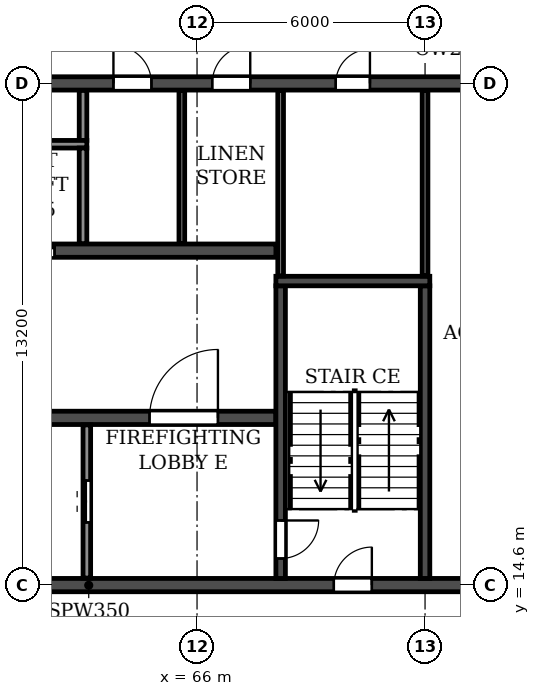
"""IFC4 building model, lengths in metres.
Left out: names, types, materials, properties, quantities, classifications, styles, units other than length and angle.
Written with IfcOpenShell. Run it as: python <this file> out.ifc"""

import sys

from ifc_helpers import new_model, si_unit, direction, frame, frame_2d, origin, place, context, subcontext, project, spatial, rectangle, extrude, element, fill, save


model = new_model("IFC4")
c1 = context("Model", 3, precision=1e-05, world=origin(), true_north=direction((0.0, 1.0)))
c2 = subcontext(c1, "Body", "Model", "MODEL_VIEW")
j1 = project(units=[si_unit("LENGTHUNIT", "METRE"), si_unit("PLANEANGLEUNIT", "RADIAN")], contexts=[c1])
p1 = place(None, origin())
s1 = spatial("IfcSite", under=j1, at=p1, CompositionType="ELEMENT")
p2 = place(p1, origin())
s2 = spatial("IfcBuilding", under=s1, at=p2, CompositionType="ELEMENT")
p3 = place(p2, frame((0.0, 0.0, 241.2)))
s3 = spatial("IfcBuildingStorey", under=s2, at=p3, CompositionType="ELEMENT", Elevation=241.2)
p4 = place(p3, frame((18.2, 14.6, 0.0), z_axis=(0.0, 0.0, 1.0), x_axis=(1.0, 0.0, 0.0)))
e1 = element("IfcWall", 1, at=p4, inside=s3, PredefinedType="SOLIDWALL", context=c2, shape_type="SweptSolid", body=[
    extrude(rectangle(XDim=65.6, YDim=0.35, at=frame_2d((32.8, 0.0))), origin(), (0.0, 0.0, 1.0), 3.08),
])
p5 = place(p4, frame((0.7, 0.0, 0.0)))
e2 = element("IfcOpeningElement", 2, at=p5, cuts=e1, PredefinedType="OPENING", context=c2, shape_type="SweptSolid", body=[
    extrude(rectangle(XDim=1.0, YDim=2.1, at=frame_2d((0.5, 1.05))), frame((0.0, 0.185, 0.0), z_axis=(0.0, -1.0, 0.0), x_axis=(1.0, 0.0, 0.0)), (0.0, 0.0, 1.0), 0.37),
])
p6 = place(p4, frame((8.6, 0.0, 0.0)))
e3 = element("IfcOpeningElement", 3, at=p6, cuts=e1, PredefinedType="OPENING", context=c2, shape_type="SweptSolid", body=[
    extrude(rectangle(XDim=1.0, YDim=2.1, at=frame_2d((0.5, 1.05))), frame((0.0, 0.185, 0.0), z_axis=(0.0, -1.0, 0.0), x_axis=(1.0, 0.0, 0.0)), (0.0, 0.0, 1.0), 0.37),
])
p7 = place(p4, frame((13.2, 0.0, 0.0)))
e4 = element("IfcOpeningElement", 4, at=p7, cuts=e1, PredefinedType="OPENING", context=c2, shape_type="SweptSolid", body=[
    extrude(rectangle(XDim=1.0, YDim=2.1, at=frame_2d((0.5, 1.05))), frame((0.0, 0.185, 0.0), z_axis=(0.0, -1.0, 0.0), x_axis=(1.0, 0.0, 0.0)), (0.0, 0.0, 1.0), 0.37),
])
p8 = place(p4, frame((25.8, 0.0, 0.0)))
e5 = element("IfcOpeningElement", 5, at=p8, cuts=e1, PredefinedType="OPENING", context=c2, shape_type="SweptSolid", body=[
    extrude(rectangle(XDim=1.0, YDim=2.1, at=frame_2d((0.5, 1.05))), frame((0.0, 0.185, 0.0), z_axis=(0.0, -1.0, 0.0), x_axis=(1.0, 0.0, 0.0)), (0.0, 0.0, 1.0), 0.37),
])
p9 = place(p4, frame((29.7, 0.0, 0.0)))
e6 = element("IfcOpeningElement", 6, at=p9, cuts=e1, PredefinedType="OPENING", context=c2, shape_type="SweptSolid", body=[
    extrude(rectangle(XDim=1.0, YDim=2.1, at=frame_2d((0.5, 1.05))), frame((0.0, 0.185, 0.0), z_axis=(0.0, -1.0, 0.0), x_axis=(1.0, 0.0, 0.0)), (0.0, 0.0, 1.0), 0.37),
])
p10 = place(p4, frame((32.3, 0.0, 0.0)))
e7 = element("IfcOpeningElement", 7, at=p10, cuts=e1, PredefinedType="OPENING", context=c2, shape_type="SweptSolid", body=[
    extrude(rectangle(XDim=1.0, YDim=2.1, at=frame_2d((0.5, 1.05))), frame((0.0, 0.185, 0.0), z_axis=(0.0, -1.0, 0.0), x_axis=(1.0, 0.0, 0.0)), (0.0, 0.0, 1.0), 0.37),
])
p11 = place(p4, frame((37.5, 0.0, 0.0)))
e8 = element("IfcOpeningElement", 8, at=p11, cuts=e1, PredefinedType="OPENING", context=c2, shape_type="SweptSolid", body=[
    extrude(rectangle(XDim=1.0, YDim=2.1, at=frame_2d((0.5, 1.05))), frame((0.0, 0.185, 0.0), z_axis=(0.0, -1.0, 0.0), x_axis=(1.0, 0.0, 0.0)), (0.0, 0.0, 1.0), 0.37),
])
p12 = place(p4, frame((51.4, 0.0, 0.0)))
e9 = element("IfcOpeningElement", 9, at=p12, cuts=e1, PredefinedType="OPENING", context=c2, shape_type="SweptSolid", body=[
    extrude(rectangle(XDim=1.0, YDim=2.1, at=frame_2d((0.5, 1.05))), frame((0.0, 0.185, 0.0), z_axis=(0.0, -1.0, 0.0), x_axis=(1.0, 0.0, 0.0)), (0.0, 0.0, 1.0), 0.37),
])
p13 = place(p4, frame((56.0, 0.0, 0.0)))
e10 = element("IfcOpeningElement", 10, at=p13, cuts=e1, PredefinedType="OPENING", context=c2, shape_type="SweptSolid", body=[
    extrude(rectangle(XDim=1.0, YDim=2.1, at=frame_2d((0.5, 1.05))), frame((0.0, 0.185, 0.0), z_axis=(0.0, -1.0, 0.0), x_axis=(1.0, 0.0, 0.0)), (0.0, 0.0, 1.0), 0.37),
])
p14 = place(p4, frame((63.9, 0.0, 0.0)))
e11 = element("IfcOpeningElement", 11, at=p14, cuts=e1, PredefinedType="OPENING", context=c2, shape_type="SweptSolid", body=[
    extrude(rectangle(XDim=1.0, YDim=2.1, at=frame_2d((0.5, 1.05))), frame((0.0, 0.185, 0.0), z_axis=(0.0, -1.0, 0.0), x_axis=(1.0, 0.0, 0.0)), (0.0, 0.0, 1.0), 0.37),
])
p15 = place(p3, frame((18.2, 27.8, 0.0), z_axis=(0.0, 0.0, 1.0), x_axis=(1.0, 0.0, 0.0)))
e12 = element("IfcWall", 12, at=p15, inside=s3, PredefinedType="SOLIDWALL", context=c2, shape_type="SweptSolid", body=[
    extrude(rectangle(XDim=65.6, YDim=0.35, at=frame_2d((32.8, 0.0))), origin(), (0.0, 0.0, 1.0), 3.08),
])
p16 = place(p15, frame((0.7, 0.0, 0.0)))
e13 = element("IfcOpeningElement", 13, at=p16, cuts=e12, PredefinedType="OPENING", context=c2, shape_type="SweptSolid", body=[
    extrude(rectangle(XDim=1.0, YDim=2.1, at=frame_2d((0.5, 1.05))), frame((0.0, 0.185, 0.0), z_axis=(0.0, -1.0, 0.0), x_axis=(1.0, 0.0, 0.0)), (0.0, 0.0, 1.0), 0.37),
])
p17 = place(p15, frame((4.05, 0.0, 0.0)))
e14 = element("IfcOpeningElement", 14, at=p17, cuts=e12, PredefinedType="OPENING", context=c2, shape_type="SweptSolid", body=[
    extrude(rectangle(XDim=0.9, YDim=2.1, at=frame_2d((0.45, 1.05))), frame((0.0, 0.185, 0.0), z_axis=(0.0, -1.0, 0.0), x_axis=(1.0, 0.0, 0.0)), (0.0, 0.0, 1.0), 0.37),
])
p18 = place(p15, frame((13.25, 0.0, 0.0)))
e15 = element("IfcOpeningElement", 15, at=p18, cuts=e12, PredefinedType="OPENING", context=c2, shape_type="SweptSolid", body=[
    extrude(rectangle(XDim=0.9, YDim=2.1, at=frame_2d((0.45, 1.05))), frame((0.0, 0.185, 0.0), z_axis=(0.0, -1.0, 0.0), x_axis=(1.0, 0.0, 0.0)), (0.0, 0.0, 1.0), 0.37),
])
p19 = place(p15, frame((17.7, 0.0, 0.0)))
e16 = element("IfcOpeningElement", 16, at=p19, cuts=e12, PredefinedType="OPENING", context=c2, shape_type="SweptSolid", body=[
    extrude(rectangle(XDim=1.0, YDim=2.1, at=frame_2d((0.5, 1.05))), frame((0.0, 0.185, 0.0), z_axis=(0.0, -1.0, 0.0), x_axis=(1.0, 0.0, 0.0)), (0.0, 0.0, 1.0), 0.37),
])
p20 = place(p15, frame((22.9, 0.0, 0.0)))
e17 = element("IfcOpeningElement", 17, at=p20, cuts=e12, PredefinedType="OPENING", context=c2, shape_type="SweptSolid", body=[
    extrude(rectangle(XDim=1.0, YDim=2.1, at=frame_2d((0.5, 1.05))), frame((0.0, 0.185, 0.0), z_axis=(0.0, -1.0, 0.0), x_axis=(1.0, 0.0, 0.0)), (0.0, 0.0, 1.0), 0.37),
])
p21 = place(p15, frame((29.4, 0.0, 0.0)))
e18 = element("IfcOpeningElement", 18, at=p21, cuts=e12, PredefinedType="OPENING", context=c2, shape_type="SweptSolid", body=[
    extrude(rectangle(XDim=1.0, YDim=2.1, at=frame_2d((0.5, 1.05))), frame((0.0, 0.185, 0.0), z_axis=(0.0, -1.0, 0.0), x_axis=(1.0, 0.0, 0.0)), (0.0, 0.0, 1.0), 0.37),
])
p22 = place(p15, frame((32.3, 0.0, 0.0)))
e19 = element("IfcOpeningElement", 19, at=p22, cuts=e12, PredefinedType="OPENING", context=c2, shape_type="SweptSolid", body=[
    extrude(rectangle(XDim=1.0, YDim=2.1, at=frame_2d((0.5, 1.05))), frame((0.0, 0.185, 0.0), z_axis=(0.0, -1.0, 0.0), x_axis=(1.0, 0.0, 0.0)), (0.0, 0.0, 1.0), 0.37),
])
p23 = place(p15, frame((36.5, 0.0, 0.0)))
e20 = element("IfcOpeningElement", 20, at=p23, cuts=e12, PredefinedType="OPENING", context=c2, shape_type="SweptSolid", body=[
    extrude(rectangle(XDim=1.0, YDim=2.1, at=frame_2d((0.5, 1.05))), frame((0.0, 0.185, 0.0), z_axis=(0.0, -1.0, 0.0), x_axis=(1.0, 0.0, 0.0)), (0.0, 0.0, 1.0), 0.37),
])
p24 = place(p15, frame((41.7, 0.0, 0.0)))
e21 = element("IfcOpeningElement", 21, at=p24, cuts=e12, PredefinedType="OPENING", context=c2, shape_type="SweptSolid", body=[
    extrude(rectangle(XDim=1.0, YDim=2.1, at=frame_2d((0.5, 1.05))), frame((0.0, 0.185, 0.0), z_axis=(0.0, -1.0, 0.0), x_axis=(1.0, 0.0, 0.0)), (0.0, 0.0, 1.0), 0.37),
])
p25 = place(p15, frame((45.6, 0.0, 0.0)))
e22 = element("IfcOpeningElement", 22, at=p25, cuts=e12, PredefinedType="OPENING", context=c2, shape_type="SweptSolid", body=[
    extrude(rectangle(XDim=1.0, YDim=2.1, at=frame_2d((0.5, 1.05))), frame((0.0, 0.185, 0.0), z_axis=(0.0, -1.0, 0.0), x_axis=(1.0, 0.0, 0.0)), (0.0, 0.0, 1.0), 0.37),
])
p26 = place(p15, frame((48.2, 0.0, 0.0)))
e23 = element("IfcOpeningElement", 23, at=p26, cuts=e12, PredefinedType="OPENING", context=c2, shape_type="SweptSolid", body=[
    extrude(rectangle(XDim=1.0, YDim=2.1, at=frame_2d((0.5, 1.05))), frame((0.0, 0.185, 0.0), z_axis=(0.0, -1.0, 0.0), x_axis=(1.0, 0.0, 0.0)), (0.0, 0.0, 1.0), 0.37),
])
p27 = place(p15, frame((51.45, 0.0, 0.0)))
e24 = element("IfcOpeningElement", 24, at=p27, cuts=e12, PredefinedType="OPENING", context=c2, shape_type="SweptSolid", body=[
    extrude(rectangle(XDim=0.9, YDim=2.1, at=frame_2d((0.45, 1.05))), frame((0.0, 0.185, 0.0), z_axis=(0.0, -1.0, 0.0), x_axis=(1.0, 0.0, 0.0)), (0.0, 0.0, 1.0), 0.37),
])
p28 = place(p15, frame((60.65, 0.0, 0.0)))
e25 = element("IfcOpeningElement", 25, at=p28, cuts=e12, PredefinedType="OPENING", context=c2, shape_type="SweptSolid", body=[
    extrude(rectangle(XDim=0.9, YDim=2.1, at=frame_2d((0.45, 1.05))), frame((0.0, 0.185, 0.0), z_axis=(0.0, -1.0, 0.0), x_axis=(1.0, 0.0, 0.0)), (0.0, 0.0, 1.0), 0.37),
])
p29 = place(p15, frame((63.9, 0.0, 0.0)))
e26 = element("IfcOpeningElement", 26, at=p29, cuts=e12, PredefinedType="OPENING", context=c2, shape_type="SweptSolid", body=[
    extrude(rectangle(XDim=1.0, YDim=2.1, at=frame_2d((0.5, 1.05))), frame((0.0, 0.185, 0.0), z_axis=(0.0, -1.0, 0.0), x_axis=(1.0, 0.0, 0.0)), (0.0, 0.0, 1.0), 0.37),
])
p30 = place(p3, frame((33.925, 19.0, 0.0), z_axis=(0.0, 0.0, 1.0), x_axis=(1.0, 0.0, 0.0)))
e27 = element("IfcWall", 27, at=p30, inside=s3, PredefinedType="SOLIDWALL", context=c2, shape_type="SweptSolid", body=[
    extrude(rectangle(XDim=34.15, YDim=0.35, at=frame_2d((17.075, 0.0))), origin(), (0.0, 0.0, 1.0), 3.08),
])
p31 = place(p30, frame((16.175, 0.0, 0.0)))
e28 = element("IfcOpeningElement", 28, at=p31, cuts=e27, PredefinedType="OPENING", context=c2, shape_type="SweptSolid", body=[
    extrude(rectangle(XDim=1.8, YDim=2.1, at=frame_2d((0.9, 1.05))), frame((0.0, 0.185, 0.0), z_axis=(0.0, -1.0, 0.0), x_axis=(1.0, 0.0, 0.0)), (0.0, 0.0, 1.0), 0.37),
])
p32 = place(p30, frame((1.525, 0.0, 0.0)))
e29 = element("IfcOpeningElement", 29, at=p32, cuts=e27, PredefinedType="OPENING", context=c2, shape_type="SweptSolid", body=[
    extrude(rectangle(XDim=1.8, YDim=2.1, at=frame_2d((0.9, 1.05))), frame((0.0, 0.185, 0.0), z_axis=(0.0, -1.0, 0.0), x_axis=(1.0, 0.0, 0.0)), (0.0, 0.0, 1.0), 0.37),
])
p33 = place(p30, frame((30.825, 0.0, 0.0)))
e30 = element("IfcOpeningElement", 30, at=p33, cuts=e27, PredefinedType="OPENING", context=c2, shape_type="SweptSolid", body=[
    extrude(rectangle(XDim=1.8, YDim=2.1, at=frame_2d((0.9, 1.05))), frame((0.0, 0.185, 0.0), z_axis=(0.0, -1.0, 0.0), x_axis=(1.0, 0.0, 0.0)), (0.0, 0.0, 1.0), 0.37),
])
p34 = place(p3, frame((33.925, 23.4, 0.0), z_axis=(0.0, 0.0, 1.0), x_axis=(1.0, 0.0, 0.0)))
e31 = element("IfcWall", 31, at=p34, inside=s3, PredefinedType="SOLIDWALL", context=c2, shape_type="SweptSolid", body=[
    extrude(rectangle(XDim=34.15, YDim=0.35, at=frame_2d((17.075, 0.0))), origin(), (0.0, 0.0, 1.0), 3.08),
])
p35 = place(p34, frame((16.175, 0.0, 0.0)))
e32 = element("IfcOpeningElement", 32, at=p35, cuts=e31, PredefinedType="OPENING", context=c2, shape_type="SweptSolid", body=[
    extrude(rectangle(XDim=1.8, YDim=2.1, at=frame_2d((0.9, 1.05))), frame((0.0, 0.185, 0.0), z_axis=(0.0, -1.0, 0.0), x_axis=(1.0, 0.0, 0.0)), (0.0, 0.0, 1.0), 0.37),
])
p36 = place(p34, frame((0.625, 0.0, 0.0)))
e33 = element("IfcOpeningElement", 33, at=p36, cuts=e31, PredefinedType="OPENING", context=c2, shape_type="SweptSolid", body=[
    extrude(rectangle(XDim=1.1, YDim=2.1, at=frame_2d((0.55, 1.05))), frame((0.0, 0.185, 0.0), z_axis=(0.0, -1.0, 0.0), x_axis=(1.0, 0.0, 0.0)), (0.0, 0.0, 1.0), 0.37),
])
p37 = place(p34, frame((3.225, 0.0, 0.0)))
e34 = element("IfcOpeningElement", 34, at=p37, cuts=e31, PredefinedType="OPENING", context=c2, shape_type="SweptSolid", body=[
    extrude(rectangle(XDim=1.1, YDim=2.1, at=frame_2d((0.55, 1.05))), frame((0.0, 0.185, 0.0), z_axis=(0.0, -1.0, 0.0), x_axis=(1.0, 0.0, 0.0)), (0.0, 0.0, 1.0), 0.37),
])
p38 = place(p34, frame((5.825, 0.0, 0.0)))
e35 = element("IfcOpeningElement", 35, at=p38, cuts=e31, PredefinedType="OPENING", context=c2, shape_type="SweptSolid", body=[
    extrude(rectangle(XDim=1.1, YDim=2.1, at=frame_2d((0.55, 1.05))), frame((0.0, 0.185, 0.0), z_axis=(0.0, -1.0, 0.0), x_axis=(1.0, 0.0, 0.0)), (0.0, 0.0, 1.0), 0.37),
])
p39 = place(p34, frame((8.425, 0.0, 0.0)))
e36 = element("IfcOpeningElement", 36, at=p39, cuts=e31, PredefinedType="OPENING", context=c2, shape_type="SweptSolid", body=[
    extrude(rectangle(XDim=1.1, YDim=2.1, at=frame_2d((0.55, 1.05))), frame((0.0, 0.185, 0.0), z_axis=(0.0, -1.0, 0.0), x_axis=(1.0, 0.0, 0.0)), (0.0, 0.0, 1.0), 0.37),
])
p40 = place(p34, frame((11.025, 0.0, 0.0)))
e37 = element("IfcOpeningElement", 37, at=p40, cuts=e31, PredefinedType="OPENING", context=c2, shape_type="SweptSolid", body=[
    extrude(rectangle(XDim=1.1, YDim=2.1, at=frame_2d((0.55, 1.05))), frame((0.0, 0.185, 0.0), z_axis=(0.0, -1.0, 0.0), x_axis=(1.0, 0.0, 0.0)), (0.0, 0.0, 1.0), 0.37),
])
p41 = place(p34, frame((13.625, 0.0, 0.0)))
e38 = element("IfcOpeningElement", 38, at=p41, cuts=e31, PredefinedType="OPENING", context=c2, shape_type="SweptSolid", body=[
    extrude(rectangle(XDim=1.1, YDim=2.1, at=frame_2d((0.55, 1.05))), frame((0.0, 0.185, 0.0), z_axis=(0.0, -1.0, 0.0), x_axis=(1.0, 0.0, 0.0)), (0.0, 0.0, 1.0), 0.37),
])
p42 = place(p34, frame((27.225, 0.0, 0.0)))
e39 = element("IfcOpeningElement", 39, at=p42, cuts=e31, PredefinedType="OPENING", context=c2, shape_type="SweptSolid", body=[
    extrude(rectangle(XDim=1.1, YDim=2.1, at=frame_2d((0.55, 1.05))), frame((0.0, 0.185, 0.0), z_axis=(0.0, -1.0, 0.0), x_axis=(1.0, 0.0, 0.0)), (0.0, 0.0, 1.0), 0.37),
])
p43 = place(p3, frame((68.2, 14.775, 0.0), z_axis=(0.0, 0.0, 1.0), x_axis=(0.0, 1.0, 0.0)))
e40 = element("IfcWall", 40, at=p43, inside=s3, PredefinedType="SOLIDWALL", context=c2, shape_type="SweptSolid", body=[
    extrude(rectangle(XDim=7.7, YDim=0.25, at=frame_2d((3.85, 0.0))), origin(), (0.0, 0.0, 1.0), 3.08),
])
p44 = place(p43, frame((0.525, 0.0, 0.0)))
e41 = element("IfcOpeningElement", 41, at=p44, cuts=e40, PredefinedType="OPENING", context=c2, shape_type="SweptSolid", body=[
    extrude(rectangle(XDim=1.0, YDim=2.1, at=frame_2d((0.5, 1.05))), frame((0.0, 0.135, 0.0), z_axis=(0.0, -1.0, 0.0), x_axis=(1.0, 0.0, 0.0)), (0.0, 0.0, 1.0), 0.27),
])
p45 = place(p3, frame((72.0, 14.775, 0.0), z_axis=(0.0, 0.0, 1.0), x_axis=(0.0, 1.0, 0.0)))
e42 = element("IfcWall", 42, at=p45, inside=s3, PredefinedType="SOLIDWALL", context=c2, shape_type="SweptSolid", body=[
    extrude(rectangle(XDim=7.7, YDim=0.25, at=frame_2d((3.85, 0.0))), origin(), (0.0, 0.0, 1.0), 3.08),
])
p46 = place(p3, frame((68.075, 22.6, 0.0), z_axis=(0.0, 0.0, 1.0), x_axis=(1.0, 0.0, 0.0)))
e43 = element("IfcWall", 43, at=p46, inside=s3, PredefinedType="SOLIDWALL", context=c2, shape_type="SweptSolid", body=[
    extrude(rectangle(XDim=4.05, YDim=0.25, at=frame_2d((2.025, 0.0))), origin(), (0.0, 0.0, 1.0), 3.08),
])
p47 = place(p3, frame((65.6, 23.585, 0.0), z_axis=(0.0, 0.0, 1.0), x_axis=(0.0, 1.0, 0.0)))
e44 = element("IfcWall", 44, at=p47, inside=s3, PredefinedType="PARTITIONING", context=c2, shape_type="SweptSolid", body=[
    extrude(rectangle(XDim=4.03, YDim=0.15, at=frame_2d((2.015, 0.0))), origin(), (0.0, 0.0, 1.0), 3.08),
])
p48 = place(p3, frame((63.0, 26.3, 0.0), z_axis=(0.0, 0.0, 1.0), x_axis=(0.0, 1.0, 0.0)))
e45 = element("IfcWall", 45, at=p48, inside=s3, PredefinedType="PARTITIONING", context=c2, shape_type="SweptSolid", body=[
    extrude(rectangle(XDim=1.315, YDim=0.2, at=frame_2d((0.657, 0.0))), origin(), (0.0, 0.0, 1.0), 3.08),
])
for number, where, z_axis, x_axis in (
    (46, (68.2, 22.735, 0.0), (0.0, 0.0, 1.0), (0.0, 1.0, 0.0)),
    (47, (72.0, 22.735, 0.0), (0.0, 0.0, 1.0), (0.0, 1.0, 0.0)),
):
    element("IfcWall", number, at=place(p3, frame(where, z_axis=z_axis, x_axis=x_axis)), inside=s3, PredefinedType="PARTITIONING", context=c2, shape_type="SweptSolid", body=[
        extrude(rectangle(XDim=4.88, YDim=0.15, at=frame_2d((2.44, 0.0))), origin(), (0.0, 0.0, 1.0), 3.08),
    ])
p49 = place(p3, frame((57.7, 26.2, 0.0), z_axis=(0.0, 0.0, 1.0), x_axis=(1.0, 0.0, 0.0)))
e48 = element("IfcWall", 48, at=p49, inside=s3, PredefinedType="PARTITIONING", context=c2, shape_type="SweptSolid", body=[
    extrude(rectangle(XDim=5.4, YDim=0.2, at=frame_2d((2.7, 0.0))), origin(), (0.0, 0.0, 1.0), 3.08),
])
p50 = place(p3, frame((63.0, 23.585, 0.0), z_axis=(0.0, 0.0, 1.0), x_axis=(0.0, 1.0, 0.0)))
e49 = element("IfcWall", 49, at=p50, inside=s3, PredefinedType="PARTITIONING", context=c2, shape_type="SweptSolid", body=[
    extrude(rectangle(XDim=2.515, YDim=0.2, at=frame_2d((1.258, 0.0))), origin(), (0.0, 0.0, 1.0), 3.08),
])
p51 = place(p3, frame((63.1, 14.785, 0.0), z_axis=(0.0, 0.0, 1.0), x_axis=(0.0, 1.0, 0.0)))
e50 = element("IfcWall", 50, at=p51, inside=s3, PredefinedType="PARTITIONING", context=c2, shape_type="SweptSolid", body=[
    extrude(rectangle(XDim=4.03, YDim=0.2, at=frame_2d((2.015, 0.0))), origin(), (0.0, 0.0, 1.0), 3.08),
])
p52 = place(p51, frame((1.465, 0.0, 0.0)))
e51 = element("IfcOpeningElement", 51, at=p52, cuts=e50, PredefinedType="OPENING", context=c2, shape_type="SweptSolid", body=[
    extrude(rectangle(XDim=1.1, YDim=2.1, at=frame_2d((0.55, 1.05))), frame((0.0, 0.11, 0.0), z_axis=(0.0, -1.0, 0.0), x_axis=(1.0, 0.0, 0.0)), (0.0, 0.0, 1.0), 0.22),
])
p53 = place(p25, origin())
e52 = element("IfcDoor", 52, at=p53, inside=s3, OperationType="SINGLE_SWING_LEFT", PredefinedType="DOOR", context=c2, shape_type="SweptSolid", body=[
    extrude(rectangle(XDim=1.0, YDim=2.1, at=frame_2d((0.5, 1.05))), frame((0.0, 0.025, 0.0), z_axis=(0.0, -1.0, 0.0), x_axis=(1.0, 0.0, 0.0)), (0.0, 0.0, 1.0), 0.05),
])
fill(e22, e52)
p54 = place(p26, origin())
e53 = element("IfcDoor", 53, at=p54, inside=s3, OperationType="SINGLE_SWING_RIGHT", PredefinedType="DOOR", context=c2, shape_type="SweptSolid", body=[
    extrude(rectangle(XDim=1.0, YDim=2.1, at=frame_2d((0.5, 1.05))), frame((0.0, 0.025, 0.0), z_axis=(0.0, -1.0, 0.0), x_axis=(1.0, 0.0, 0.0)), (0.0, 0.0, 1.0), 0.05),
])
fill(e23, e53)
p55 = place(p27, origin())
e54 = element("IfcDoor", 54, at=p55, inside=s3, OperationType="SINGLE_SWING_RIGHT", PredefinedType="DOOR", context=c2, shape_type="SweptSolid", body=[
    extrude(rectangle(XDim=0.9, YDim=2.1, at=frame_2d((0.45, 1.05))), frame((0.0, 0.025, 0.0), z_axis=(0.0, -1.0, 0.0), x_axis=(1.0, 0.0, 0.0)), (0.0, 0.0, 1.0), 0.05),
])
fill(e24, e54)
p56 = place(p12, origin())
e55 = element("IfcDoor", 55, at=p56, inside=s3, OperationType="SINGLE_SWING_RIGHT", PredefinedType="DOOR", context=c2, shape_type="SweptSolid", body=[
    extrude(rectangle(XDim=1.0, YDim=2.1, at=frame_2d((0.5, 1.05))), frame((0.0, 0.025, 0.0), z_axis=(0.0, -1.0, 0.0), x_axis=(1.0, 0.0, 0.0)), (0.0, 0.0, 1.0), 0.05),
])
fill(e9, e55)
p57 = place(p52, origin())
e56 = element("IfcDoor", 56, at=p57, inside=s3, OperationType="DOUBLE_DOOR_SLIDING", PredefinedType="DOOR", context=c2, shape_type="SweptSolid", body=[
    extrude(rectangle(XDim=1.1, YDim=2.1, at=frame_2d((0.55, 1.05))), frame((0.0, 0.025, 0.0), z_axis=(0.0, -1.0, 0.0), x_axis=(1.0, 0.0, 0.0)), (0.0, 0.0, 1.0), 0.05),
])
fill(e51, e56)
p58 = place(p44, frame((1.0, 0.0, 0.0), z_axis=(0.0, 0.0, 1.0), x_axis=(-1.0, 0.0, 0.0)))
e57 = element("IfcDoor", 57, at=p58, inside=s3, OperationType="SINGLE_SWING_LEFT", PredefinedType="DOOR", context=c2, shape_type="SweptSolid", body=[
    extrude(rectangle(XDim=1.0, YDim=2.1, at=frame_2d((0.5, 1.05))), frame((0.0, 0.025, 0.0), z_axis=(0.0, -1.0, 0.0), x_axis=(1.0, 0.0, 0.0)), (0.0, 0.0, 1.0), 0.05),
])
fill(e41, e57)
p59 = place(p42, origin())
e58 = element("IfcDoor", 58, at=p59, inside=s3, OperationType="DOUBLE_DOOR_SLIDING", PredefinedType="DOOR", context=c2, shape_type="SweptSolid", body=[
    extrude(rectangle(XDim=1.1, YDim=2.1, at=frame_2d((0.55, 1.05))), frame((0.0, 0.025, 0.0), z_axis=(0.0, -1.0, 0.0), x_axis=(1.0, 0.0, 0.0)), (0.0, 0.0, 1.0), 0.05),
])
fill(e39, e58)
p60 = place(p33, origin())
e59 = element("IfcDoor", 59, at=p60, inside=s3, OperationType="DOUBLE_DOOR_SINGLE_SWING", PredefinedType="DOOR", context=c2, shape_type="SweptSolid", body=[
    extrude(rectangle(XDim=1.8, YDim=2.1, at=frame_2d((0.9, 1.05))), frame((0.0, 0.025, 0.0), z_axis=(0.0, -1.0, 0.0), x_axis=(1.0, 0.0, 0.0)), (0.0, 0.0, 1.0), 0.05),
])
fill(e30, e59)
save(model, sys.argv[1])
